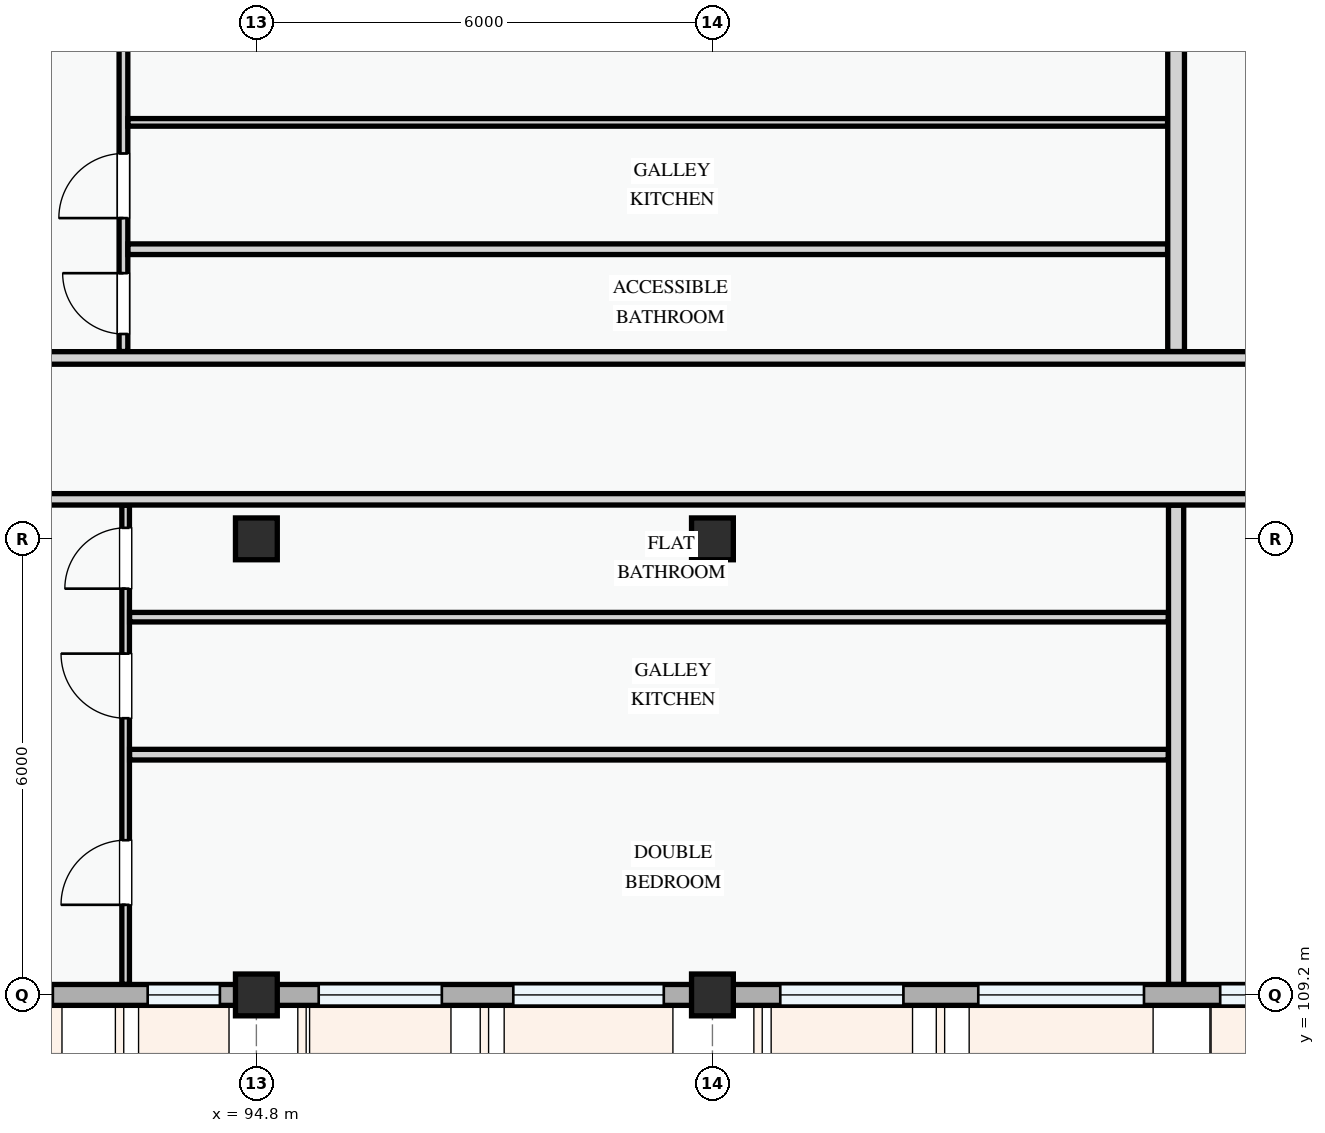
"""IFC4 building model, lengths in metres.
Left out: names, types, materials, properties, quantities, classifications, styles, units other than length and angle.
Written with IfcOpenShell. Run it as: python <this file> out.ifc"""

import sys

from ifc_helpers import new_model, si_unit, direction, frame, frame_2d, origin, origin_2d, place, context, subcontext, project, spatial, rectangle, extrude, element, fill, save


model = new_model("IFC4")
c1 = context("Model", 3, precision=1e-05, world=origin(), true_north=direction((0.0, 1.0)))
c2 = subcontext(c1, "Body", "Model", "MODEL_VIEW")
j1 = project(units=[si_unit("LENGTHUNIT", "METRE"), si_unit("PLANEANGLEUNIT", "RADIAN")], contexts=[c1])
p1 = place(None, origin())
s1 = spatial("IfcSite", under=j1, at=p1, CompositionType="ELEMENT")
p2 = place(p1, origin())
s2 = spatial("IfcBuilding", under=s1, at=p2, CompositionType="ELEMENT")
p3 = place(p2, frame((0.0, 0.0, 27.9)))
s3 = spatial("IfcBuildingStorey", under=s2, at=p3, CompositionType="ELEMENT", Elevation=27.9)
for number, where, z_axis, x_axis in (
    (1, (94.8, 109.2, 0.0), (0.0, 0.0, 1.0), (1.0, 0.0, 0.0)),
    (2, (94.8, 115.2, 0.0), (0.0, 0.0, 1.0), (1.0, 0.0, 0.0)),
    (3, (100.8, 109.2, 0.0), (0.0, 0.0, 1.0), (1.0, 0.0, 0.0)),
    (4, (100.8, 115.2, 0.0), (0.0, 0.0, 1.0), (1.0, 0.0, 0.0)),
):
    element("IfcColumn", number, at=place(p3, frame(where, z_axis=z_axis, x_axis=x_axis)), inside=s3, PredefinedType="COLUMN", context=c2, shape_type="SweptSolid", body=[
        extrude(rectangle(XDim=0.55, YDim=0.55, at=origin_2d()), origin(), (0.0, 0.0, 1.0), 3.3),
    ])
p4 = place(p3, frame((86.4, 109.2, 0.0), z_axis=(0.0, 0.0, 1.0), x_axis=(1.0, 0.0, 0.0)))
e5 = element("IfcWall", 5, at=p4, inside=s3, PredefinedType="STANDARD", context=c2, shape_type="SweptSolid", body=[
    extrude(rectangle(XDim=8.4, YDim=0.275, at=frame_2d((4.2, 0.0))), origin(), (0.0, 0.0, 1.0), 2.375),
])
p5 = place(p4, frame((0.607, 0.0, 0.78)))
e6 = element("IfcOpeningElement", 6, at=p5, cuts=e5, PredefinedType="OPENING", context=c2, shape_type="SweptSolid", body=[
    extrude(rectangle(XDim=2.48, YDim=1.46, at=frame_2d((1.24, 0.73))), frame((0.0, 0.147, 0.0), z_axis=(0.0, -1.0, 0.0), x_axis=(1.0, 0.0, 0.0)), (0.0, 0.0, 1.0), 0.295),
])
p6 = place(p4, frame((4.323, 0.0, 0.78)))
e7 = element("IfcOpeningElement", 7, at=p6, cuts=e5, PredefinedType="OPENING", context=c2, shape_type="SweptSolid", body=[
    extrude(rectangle(XDim=1.4, YDim=1.45, at=frame_2d((0.7, 0.725))), frame((0.0, 0.147, 0.0), z_axis=(0.0, -1.0, 0.0), x_axis=(1.0, 0.0, 0.0)), (0.0, 0.0, 1.0), 0.295),
])
p7 = place(p4, frame((6.97, 0.0, 0.78)))
e8 = element("IfcOpeningElement", 8, at=p7, cuts=e5, PredefinedType="OPENING", context=c2, shape_type="SweptSolid", body=[
    extrude(rectangle(XDim=0.95, YDim=1.15, at=frame_2d((0.475, 0.575))), frame((0.0, 0.147, 0.0), z_axis=(0.0, -1.0, 0.0), x_axis=(1.0, 0.0, 0.0)), (0.0, 0.0, 1.0), 0.295),
])
p8 = place(p3, frame((94.8, 109.2, 0.0), z_axis=(0.0, 0.0, 1.0), x_axis=(1.0, 0.0, 0.0)))
e9 = element("IfcWall", 9, at=p8, inside=s3, PredefinedType="STANDARD", context=c2, shape_type="SweptSolid", body=[
    extrude(rectangle(XDim=6.0, YDim=0.275, at=frame_2d((3.0, 0.0))), origin(), (0.0, 0.0, 1.0), 2.475),
])
p9 = place(p8, frame((0.82, 0.0, 0.78)))
e10 = element("IfcOpeningElement", 10, at=p9, cuts=e9, PredefinedType="OPENING", context=c2, shape_type="SweptSolid", body=[
    extrude(rectangle(XDim=1.62, YDim=1.38, at=frame_2d((0.81, 0.69))), frame((0.0, 0.147, 0.0), z_axis=(0.0, -1.0, 0.0), x_axis=(1.0, 0.0, 0.0)), (0.0, 0.0, 1.0), 0.295),
])
p10 = place(p8, frame((3.38, 0.0, 0.78)))
e11 = element("IfcOpeningElement", 11, at=p10, cuts=e9, PredefinedType="OPENING", context=c2, shape_type="SweptSolid", body=[
    extrude(rectangle(XDim=1.98, YDim=1.5, at=frame_2d((0.99, 0.75))), frame((0.0, 0.147, 0.0), z_axis=(0.0, -1.0, 0.0), x_axis=(1.0, 0.0, 0.0)), (0.0, 0.0, 1.0), 0.295),
])
p11 = place(p3, frame((100.8, 109.2, 0.0), z_axis=(0.0, 0.0, 1.0), x_axis=(1.0, 0.0, 0.0)))
e12 = element("IfcWall", 12, at=p11, inside=s3, PredefinedType="STANDARD", context=c2, shape_type="SweptSolid", body=[
    extrude(rectangle(XDim=8.4, YDim=0.275, at=frame_2d((4.2, 0.0))), origin(), (0.0, 0.0, 1.0), 2.375),
])
p12 = place(p11, frame((0.893, 0.0, 0.78)))
e13 = element("IfcOpeningElement", 13, at=p12, cuts=e12, PredefinedType="OPENING", context=c2, shape_type="SweptSolid", body=[
    extrude(rectangle(XDim=1.62, YDim=1.38, at=frame_2d((0.81, 0.69))), frame((0.0, 0.147, 0.0), z_axis=(0.0, -1.0, 0.0), x_axis=(1.0, 0.0, 0.0)), (0.0, 0.0, 1.0), 0.295),
])
p13 = place(p11, frame((3.498, 0.0, 0.78)))
e14 = element("IfcOpeningElement", 14, at=p13, cuts=e12, PredefinedType="OPENING", context=c2, shape_type="SweptSolid", body=[
    extrude(rectangle(XDim=2.18, YDim=1.48, at=frame_2d((1.09, 0.74))), frame((0.0, 0.147, 0.0), z_axis=(0.0, -1.0, 0.0), x_axis=(1.0, 0.0, 0.0)), (0.0, 0.0, 1.0), 0.295),
])
p14 = place(p11, frame((6.68, 0.0, 0.78)))
e15 = element("IfcOpeningElement", 15, at=p14, cuts=e12, PredefinedType="OPENING", context=c2, shape_type="SweptSolid", body=[
    extrude(rectangle(XDim=0.95, YDim=1.15, at=frame_2d((0.475, 0.575))), frame((0.0, 0.147, 0.0), z_axis=(0.0, -1.0, 0.0), x_axis=(1.0, 0.0, 0.0)), (0.0, 0.0, 1.0), 0.295),
])
p15 = place(p3, frame((93.08, 109.34, 0.0), z_axis=(0.0, 0.0, 1.0), x_axis=(0.0, 1.0, 0.0)))
e16 = element("IfcWall", 16, at=p15, inside=s3, PredefinedType="PARTITIONING", context=c2, shape_type="SweptSolid", body=[
    extrude(rectangle(XDim=6.303, YDim=0.1, at=frame_2d((3.152, 0.0))), origin(), (0.0, 0.0, 1.0), 3.0),
])
p16 = place(p15, frame((1.046, 0.0, 0.0)))
e17 = element("IfcOpeningElement", 17, at=p16, cuts=e16, PredefinedType="OPENING", context=c2, shape_type="SweptSolid", body=[
    extrude(rectangle(XDim=0.85, YDim=2.1, at=frame_2d((0.425, 1.05))), frame((0.0, 0.06, 0.0), z_axis=(0.0, -1.0, 0.0), x_axis=(1.0, 0.0, 0.0)), (0.0, 0.0, 1.0), 0.12),
])
p17 = place(p15, frame((3.501, 0.0, 0.0)))
e18 = element("IfcOpeningElement", 18, at=p17, cuts=e16, PredefinedType="OPENING", context=c2, shape_type="SweptSolid", body=[
    extrude(rectangle(XDim=0.85, YDim=2.1, at=frame_2d((0.425, 1.05))), frame((0.0, 0.06, 0.0), z_axis=(0.0, -1.0, 0.0), x_axis=(1.0, 0.0, 0.0)), (0.0, 0.0, 1.0), 0.12),
])
p18 = place(p15, frame((5.205, 0.0, 0.0)))
e19 = element("IfcOpeningElement", 19, at=p18, cuts=e16, PredefinedType="OPENING", context=c2, shape_type="SweptSolid", body=[
    extrude(rectangle(XDim=0.8, YDim=2.1, at=frame_2d((0.4, 1.05))), frame((0.0, 0.06, 0.0), z_axis=(0.0, -1.0, 0.0), x_axis=(1.0, 0.0, 0.0)), (0.0, 0.0, 1.0), 0.12),
])
p19 = place(p3, frame((93.132, 112.361, 0.0), z_axis=(0.0, 0.0, 1.0), x_axis=(1.0, 0.0, 0.0)))
e20 = element("IfcWall", 20, at=p19, inside=s3, PredefinedType="PARTITIONING", context=c2, shape_type="SweptSolid", body=[
    extrude(rectangle(XDim=13.666, YDim=0.14, at=frame_2d((6.833, 0.0))), origin(), (0.0, 0.0, 1.0), 3.0),
])
p20 = place(p3, frame((93.132, 114.17, 0.0), z_axis=(0.0, 0.0, 1.0), x_axis=(1.0, 0.0, 0.0)))
e21 = element("IfcWall", 21, at=p20, inside=s3, PredefinedType="PARTITIONING", context=c2, shape_type="SweptSolid", body=[
    extrude(rectangle(XDim=13.666, YDim=0.125, at=frame_2d((6.833, 0.0))), origin(), (0.0, 0.0, 1.0), 3.0),
])
p21 = place(p3, frame((93.051, 117.665, 0.0), z_axis=(0.0, 0.0, 1.0), x_axis=(0.0, 1.0, 0.0)))
e22 = element("IfcWall", 22, at=p21, inside=s3, PredefinedType="PARTITIONING", context=c2, shape_type="SweptSolid", body=[
    extrude(rectangle(XDim=5.796, YDim=0.115, at=frame_2d((2.898, 0.0))), origin(), (0.0, 0.0, 1.0), 3.0),
])
p22 = place(p21, frame((0.231, 0.0, 0.0)))
e23 = element("IfcOpeningElement", 23, at=p22, cuts=e22, PredefinedType="OPENING", context=c2, shape_type="SweptSolid", body=[
    extrude(rectangle(XDim=0.8, YDim=2.1, at=frame_2d((0.4, 1.05))), frame((0.0, 0.067, 0.0), z_axis=(0.0, -1.0, 0.0), x_axis=(1.0, 0.0, 0.0)), (0.0, 0.0, 1.0), 0.135),
])
p23 = place(p21, frame((1.755, 0.0, 0.0)))
e24 = element("IfcOpeningElement", 24, at=p23, cuts=e22, PredefinedType="OPENING", context=c2, shape_type="SweptSolid", body=[
    extrude(rectangle(XDim=0.85, YDim=2.1, at=frame_2d((0.425, 1.05))), frame((0.0, 0.067, 0.0), z_axis=(0.0, -1.0, 0.0), x_axis=(1.0, 0.0, 0.0)), (0.0, 0.0, 1.0), 0.135),
])
p24 = place(p21, frame((4.02, 0.0, 0.0)))
e25 = element("IfcOpeningElement", 25, at=p24, cuts=e22, PredefinedType="OPENING", context=c2, shape_type="SweptSolid", body=[
    extrude(rectangle(XDim=0.85, YDim=2.1, at=frame_2d((0.425, 1.05))), frame((0.0, 0.067, 0.0), z_axis=(0.0, -1.0, 0.0), x_axis=(1.0, 0.0, 0.0)), (0.0, 0.0, 1.0), 0.135),
])
p25 = place(p3, frame((93.111, 120.679, 0.0), z_axis=(0.0, 0.0, 1.0), x_axis=(1.0, 0.0, 0.0)))
e26 = element("IfcWall", 26, at=p25, inside=s3, PredefinedType="PARTITIONING", context=c2, shape_type="SweptSolid", body=[
    extrude(rectangle(XDim=13.677, YDim=0.1, at=frame_2d((6.839, 0.0))), origin(), (0.0, 0.0, 1.0), 3.0),
])
p26 = place(p3, frame((93.111, 119.01, 0.0), z_axis=(0.0, 0.0, 1.0), x_axis=(1.0, 0.0, 0.0)))
e27 = element("IfcWall", 27, at=p26, inside=s3, PredefinedType="PARTITIONING", context=c2, shape_type="SweptSolid", body=[
    extrude(rectangle(XDim=13.677, YDim=0.14, at=frame_2d((6.839, 0.0))), origin(), (0.0, 0.0, 1.0), 3.0),
])
p27 = place(p3, frame((106.9, 109.34, 0.0), z_axis=(0.0, 0.0, 1.0), x_axis=(0.0, 1.0, 0.0)))
e28 = element("IfcWall", 28, at=p27, inside=s3, PredefinedType="PARTITIONING", context=c2, shape_type="SweptSolid", body=[
    extrude(rectangle(XDim=6.303, YDim=0.2, at=frame_2d((3.152, 0.0))), origin(), (0.0, 0.0, 1.0), 3.0),
])
p28 = place(p3, frame((106.9, 117.665, 0.0), z_axis=(0.0, 0.0, 1.0), x_axis=(0.0, 1.0, 0.0)))
e29 = element("IfcWall", 29, at=p28, inside=s3, PredefinedType="PARTITIONING", context=c2, shape_type="SweptSolid", body=[
    extrude(rectangle(XDim=5.796, YDim=0.22, at=frame_2d((2.898, 0.0))), origin(), (0.0, 0.0, 1.0), 3.0),
])
p29 = place(p3, frame((80.54, 115.72, 0.0), z_axis=(0.0, 0.0, 1.0), x_axis=(1.0, 0.0, 0.0)))
e30 = element("IfcWall", 30, at=p29, inside=s3, PredefinedType="PARTITIONING", context=c2, shape_type="SweptSolid", body=[
    extrude(rectangle(XDim=69.51, YDim=0.15, at=frame_2d((34.755, 0.0))), origin(), (0.0, 0.0, 1.0), 3.0),
])
p30 = place(p29, frame((9.587, 0.0, 0.0)))
e31 = element("IfcOpeningElement", 31, at=p30, cuts=e30, PredefinedType="OPENING", context=c2, shape_type="SweptSolid", body=[
    extrude(rectangle(XDim=0.92, YDim=2.1, at=frame_2d((0.46, 1.05))), frame((0.0, 0.085, 0.0), z_axis=(0.0, -1.0, 0.0), x_axis=(1.0, 0.0, 0.0)), (0.0, 0.0, 1.0), 0.17),
])
p31 = place(p29, frame((37.68, 0.0, 0.0)))
e32 = element("IfcOpeningElement", 32, at=p31, cuts=e30, PredefinedType="OPENING", context=c2, shape_type="SweptSolid", body=[
    extrude(rectangle(XDim=0.92, YDim=2.1, at=frame_2d((0.46, 1.05))), frame((0.0, 0.085, 0.0), z_axis=(0.0, -1.0, 0.0), x_axis=(1.0, 0.0, 0.0)), (0.0, 0.0, 1.0), 0.17),
])
p32 = place(p29, frame((52.856, 0.0, 0.0)))
e33 = element("IfcOpeningElement", 33, at=p32, cuts=e30, PredefinedType="OPENING", context=c2, shape_type="SweptSolid", body=[
    extrude(rectangle(XDim=0.92, YDim=2.1, at=frame_2d((0.46, 1.05))), frame((0.0, 0.085, 0.0), z_axis=(0.0, -1.0, 0.0), x_axis=(1.0, 0.0, 0.0)), (0.0, 0.0, 1.0), 0.17),
])
p33 = place(p3, frame((80.54, 117.58, 0.0), z_axis=(0.0, 0.0, 1.0), x_axis=(1.0, 0.0, 0.0)))
e34 = element("IfcWall", 34, at=p33, inside=s3, PredefinedType="PARTITIONING", context=c2, shape_type="SweptSolid", body=[
    extrude(rectangle(XDim=72.0, YDim=0.165, at=frame_2d((36.0, 0.0))), origin(), (0.0, 0.0, 1.0), 3.0),
])
p34 = place(p33, frame((9.562, 0.0, 0.0)))
e35 = element("IfcOpeningElement", 35, at=p34, cuts=e34, PredefinedType="OPENING", context=c2, shape_type="SweptSolid", body=[
    extrude(rectangle(XDim=0.96, YDim=2.12, at=frame_2d((0.48, 1.06))), frame((0.0, 0.093, 0.0), z_axis=(0.0, -1.0, 0.0), x_axis=(1.0, 0.0, 0.0)), (0.0, 0.0, 1.0), 0.185),
])
p35 = place(p33, frame((37.179, 0.0, 0.0)))
e36 = element("IfcOpeningElement", 36, at=p35, cuts=e34, PredefinedType="OPENING", context=c2, shape_type="SweptSolid", body=[
    extrude(rectangle(XDim=0.92, YDim=2.1, at=frame_2d((0.46, 1.05))), frame((0.0, 0.093, 0.0), z_axis=(0.0, -1.0, 0.0), x_axis=(1.0, 0.0, 0.0)), (0.0, 0.0, 1.0), 0.185),
])
p36 = place(p33, frame((52.799, 0.0, 0.0)))
e37 = element("IfcOpeningElement", 37, at=p36, cuts=e34, PredefinedType="OPENING", context=c2, shape_type="SweptSolid", body=[
    extrude(rectangle(XDim=0.92, YDim=2.1, at=frame_2d((0.46, 1.05))), frame((0.0, 0.093, 0.0), z_axis=(0.0, -1.0, 0.0), x_axis=(1.0, 0.0, 0.0)), (0.0, 0.0, 1.0), 0.185),
])
p37 = place(p6, origin())
e38 = element("IfcWindow", 38, at=p37, inside=s3, PartitioningType="SINGLE_PANEL", PredefinedType="WINDOW", context=c2, shape_type="SweptSolid", body=[
    extrude(rectangle(XDim=1.4, YDim=1.45, at=frame_2d((0.7, 0.725))), frame((0.0, 0.03, 0.0), z_axis=(0.0, -1.0, 0.0), x_axis=(1.0, 0.0, 0.0)), (0.0, 0.0, 1.0), 0.06),
])
fill(e7, e38)
p38 = place(p7, origin())
e39 = element("IfcWindow", 39, at=p38, inside=s3, PartitioningType="SINGLE_PANEL", PredefinedType="WINDOW", context=c2, shape_type="SweptSolid", body=[
    extrude(rectangle(XDim=0.95, YDim=1.15, at=frame_2d((0.475, 0.575))), frame((0.0, 0.03, 0.0), z_axis=(0.0, -1.0, 0.0), x_axis=(1.0, 0.0, 0.0)), (0.0, 0.0, 1.0), 0.06),
])
fill(e8, e39)
p39 = place(p9, origin())
e40 = element("IfcWindow", 40, at=p39, inside=s3, PartitioningType="DOUBLE_PANEL_VERTICAL", PredefinedType="WINDOW", context=c2, shape_type="SweptSolid", body=[
    extrude(rectangle(XDim=1.62, YDim=1.38, at=frame_2d((0.81, 0.69))), frame((0.0, 0.03, 0.0), z_axis=(0.0, -1.0, 0.0), x_axis=(1.0, 0.0, 0.0)), (0.0, 0.0, 1.0), 0.06),
])
fill(e10, e40)
p40 = place(p10, origin())
e41 = element("IfcWindow", 41, at=p40, inside=s3, PartitioningType="DOUBLE_PANEL_VERTICAL", PredefinedType="WINDOW", context=c2, shape_type="SweptSolid", body=[
    extrude(rectangle(XDim=1.98, YDim=1.5, at=frame_2d((0.99, 0.75))), frame((0.0, 0.03, 0.0), z_axis=(0.0, -1.0, 0.0), x_axis=(1.0, 0.0, 0.0)), (0.0, 0.0, 1.0), 0.06),
])
fill(e11, e41)
p41 = place(p12, origin())
e42 = element("IfcWindow", 42, at=p41, inside=s3, PartitioningType="DOUBLE_PANEL_VERTICAL", PredefinedType="WINDOW", context=c2, shape_type="SweptSolid", body=[
    extrude(rectangle(XDim=1.62, YDim=1.38, at=frame_2d((0.81, 0.69))), frame((0.0, 0.03, 0.0), z_axis=(0.0, -1.0, 0.0), x_axis=(1.0, 0.0, 0.0)), (0.0, 0.0, 1.0), 0.06),
])
fill(e13, e42)
p42 = place(p13, origin())
e43 = element("IfcWindow", 43, at=p42, inside=s3, PartitioningType="DOUBLE_PANEL_VERTICAL", PredefinedType="WINDOW", context=c2, shape_type="SweptSolid", body=[
    extrude(rectangle(XDim=2.18, YDim=1.48, at=frame_2d((1.09, 0.74))), frame((0.0, 0.03, 0.0), z_axis=(0.0, -1.0, 0.0), x_axis=(1.0, 0.0, 0.0)), (0.0, 0.0, 1.0), 0.06),
])
fill(e14, e43)
p43 = place(p14, origin())
e44 = element("IfcWindow", 44, at=p43, inside=s3, PartitioningType="SINGLE_PANEL", PredefinedType="WINDOW", context=c2, shape_type="SweptSolid", body=[
    extrude(rectangle(XDim=0.95, YDim=1.15, at=frame_2d((0.475, 0.575))), frame((0.0, 0.03, 0.0), z_axis=(0.0, -1.0, 0.0), x_axis=(1.0, 0.0, 0.0)), (0.0, 0.0, 1.0), 0.06),
])
fill(e15, e44)
p44 = place(p16, origin())
e45 = element("IfcDoor", 45, at=p44, inside=s3, OperationType="SINGLE_SWING_LEFT", PredefinedType="DOOR", context=c2, shape_type="SweptSolid", body=[
    extrude(rectangle(XDim=0.85, YDim=2.1, at=frame_2d((0.425, 1.05))), frame((0.0, 0.025, 0.0), z_axis=(0.0, -1.0, 0.0), x_axis=(1.0, 0.0, 0.0)), (0.0, 0.0, 1.0), 0.05),
])
fill(e17, e45)
p45 = place(p17, origin())
e46 = element("IfcDoor", 46, at=p45, inside=s3, OperationType="SINGLE_SWING_RIGHT", PredefinedType="DOOR", context=c2, shape_type="SweptSolid", body=[
    extrude(rectangle(XDim=0.85, YDim=2.1, at=frame_2d((0.425, 1.05))), frame((0.0, 0.025, 0.0), z_axis=(0.0, -1.0, 0.0), x_axis=(1.0, 0.0, 0.0)), (0.0, 0.0, 1.0), 0.05),
])
fill(e18, e46)
p46 = place(p18, origin())
e47 = element("IfcDoor", 47, at=p46, inside=s3, OperationType="SINGLE_SWING_LEFT", PredefinedType="DOOR", context=c2, shape_type="SweptSolid", body=[
    extrude(rectangle(XDim=0.8, YDim=2.1, at=frame_2d((0.4, 1.05))), frame((0.0, 0.025, 0.0), z_axis=(0.0, -1.0, 0.0), x_axis=(1.0, 0.0, 0.0)), (0.0, 0.0, 1.0), 0.05),
])
fill(e19, e47)
p47 = place(p22, origin())
e48 = element("IfcDoor", 48, at=p47, inside=s3, OperationType="SINGLE_SWING_RIGHT", PredefinedType="DOOR", context=c2, shape_type="SweptSolid", body=[
    extrude(rectangle(XDim=0.8, YDim=2.1, at=frame_2d((0.4, 1.05))), frame((0.0, 0.025, 0.0), z_axis=(0.0, -1.0, 0.0), x_axis=(1.0, 0.0, 0.0)), (0.0, 0.0, 1.0), 0.05),
])
fill(e23, e48)
p48 = place(p23, origin())
e49 = element("IfcDoor", 49, at=p48, inside=s3, OperationType="SINGLE_SWING_LEFT", PredefinedType="DOOR", context=c2, shape_type="SweptSolid", body=[
    extrude(rectangle(XDim=0.85, YDim=2.1, at=frame_2d((0.425, 1.05))), frame((0.0, 0.025, 0.0), z_axis=(0.0, -1.0, 0.0), x_axis=(1.0, 0.0, 0.0)), (0.0, 0.0, 1.0), 0.05),
])
fill(e24, e49)
save(model, sys.argv[1])
